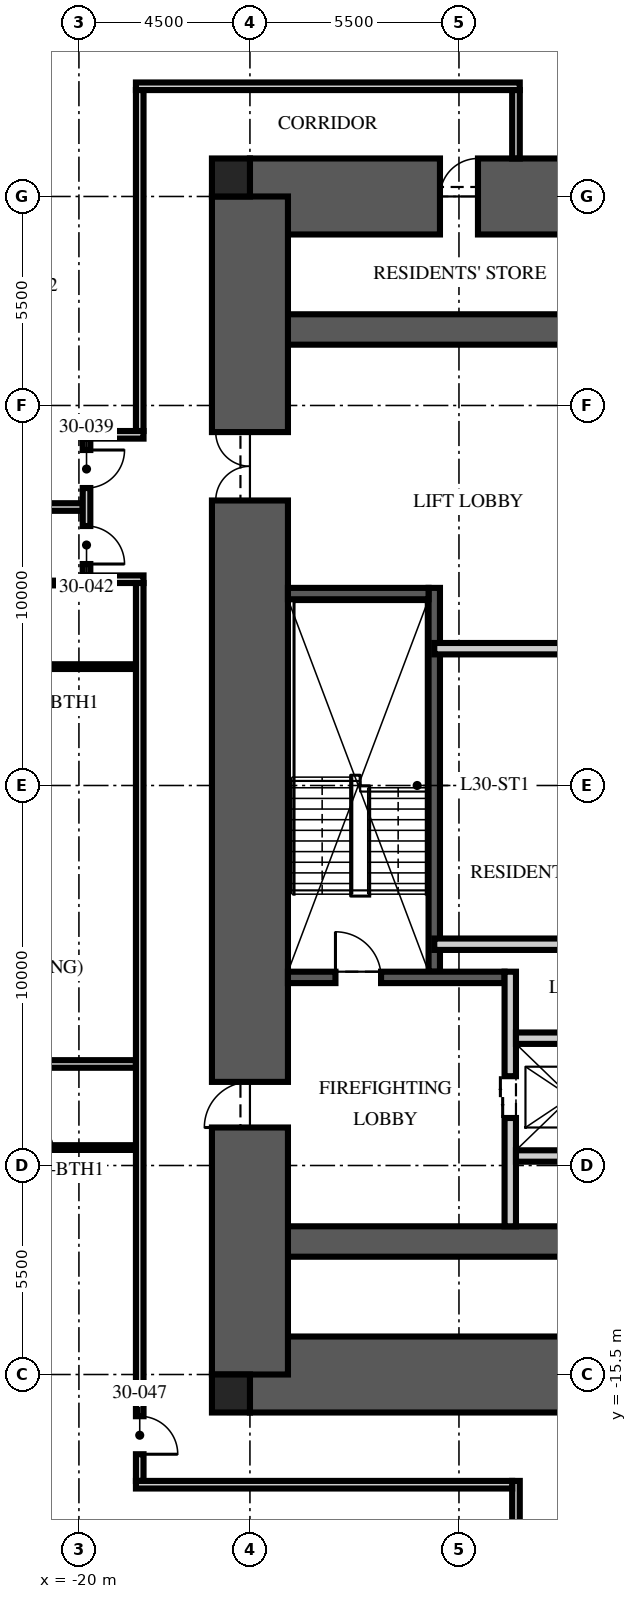
"""IFC4 building model, lengths in metres.
Left out: names, types, materials, properties, quantities, classifications, styles, units other than length and angle.
Written with IfcOpenShell. Run it as: python <this file> out.ifc"""

import sys

from ifc_helpers import new_model, si_unit, direction, frame, frame_2d, origin, origin_2d, place, context, subcontext, project, spatial, rectangle, extrude, element, fill, save


model = new_model("IFC4")
c1 = context("Model", 3, precision=1e-05, world=origin(), true_north=direction((0.0, 1.0)))
c2 = subcontext(c1, "Body", "Model", "MODEL_VIEW")
j1 = project(units=[si_unit("LENGTHUNIT", "METRE"), si_unit("PLANEANGLEUNIT", "RADIAN")], contexts=[c1])
p1 = place(None, origin())
s1 = spatial("IfcSite", under=j1, at=p1, CompositionType="ELEMENT")
p2 = place(p1, origin())
s2 = spatial("IfcBuilding", under=s1, at=p2, CompositionType="ELEMENT")
p3 = place(p2, frame((0.0, 0.0, 122.25)))
s3 = spatial("IfcBuildingStorey", under=s2, at=p3, CompositionType="ELEMENT", Elevation=122.25)
p4 = place(p3, frame((-15.5, 15.5, -0.25), z_axis=(0.0, 0.0, 1.0), x_axis=(1.0, 0.0, 0.0)))
e1 = element("IfcWall", 1, at=p4, inside=s3, PredefinedType="SHEAR", context=c2, shape_type="SweptSolid", body=[
    extrude(rectangle(XDim=31.0, YDim=2.0, at=frame_2d((15.5, 0.0))), origin(), (0.0, 0.0, 1.0), 3.75),
])
p5 = place(p4, frame((5.0, 0.0, 0.25)))
e2 = element("IfcOpeningElement", 2, at=p5, cuts=e1, PredefinedType="OPENING", context=c2, shape_type="SweptSolid", body=[
    extrude(rectangle(XDim=1.0, YDim=2.1, at=frame_2d((0.5, 1.05))), frame((0.0, 1.01, 0.0), z_axis=(0.0, -1.0, 0.0), x_axis=(1.0, 0.0, 0.0)), (0.0, 0.0, 1.0), 2.02),
])
p6 = place(p3, frame((-15.5, -15.5, -0.25), z_axis=(0.0, 0.0, 1.0), x_axis=(1.0, 0.0, 0.0)))
e3 = element("IfcWall", 3, at=p6, inside=s3, PredefinedType="SHEAR", context=c2, shape_type="SweptSolid", body=[
    extrude(rectangle(XDim=31.0, YDim=2.0, at=frame_2d((15.5, 0.0))), origin(), (0.0, 0.0, 1.0), 3.75),
])
p7 = place(p6, frame((10.4, 0.0, 0.25)))
e4 = element("IfcOpeningElement", 4, at=p7, cuts=e3, PredefinedType="OPENING", context=c2, shape_type="SweptSolid", body=[
    extrude(rectangle(XDim=1.1, YDim=2.1, at=frame_2d((0.55, 1.05))), frame((0.0, 1.01, 0.0), z_axis=(0.0, -1.0, 0.0), x_axis=(1.0, 0.0, 0.0)), (0.0, 0.0, 1.0), 2.02),
])
p8 = place(p6, frame((13.5, 0.0, 0.25)))
e5 = element("IfcOpeningElement", 5, at=p8, cuts=e3, PredefinedType="OPENING", context=c2, shape_type="SweptSolid", body=[
    extrude(rectangle(XDim=1.1, YDim=2.1, at=frame_2d((0.55, 1.05))), frame((0.0, 1.01, 0.0), z_axis=(0.0, -1.0, 0.0), x_axis=(1.0, 0.0, 0.0)), (0.0, 0.0, 1.0), 2.02),
])
p9 = place(p6, frame((16.6, 0.0, 0.25)))
e6 = element("IfcOpeningElement", 6, at=p9, cuts=e3, PredefinedType="OPENING", context=c2, shape_type="SweptSolid", body=[
    extrude(rectangle(XDim=1.1, YDim=2.1, at=frame_2d((0.55, 1.05))), frame((0.0, 1.01, 0.0), z_axis=(0.0, -1.0, 0.0), x_axis=(1.0, 0.0, 0.0)), (0.0, 0.0, 1.0), 2.02),
])
for number, where, z_axis, x_axis in (
    (7, (-15.5, 12.0, -0.25), (0.0, 0.0, 1.0), (1.0, 0.0, 0.0)),
    (8, (-15.5, -12.0, -0.25), (0.0, 0.0, 1.0), (1.0, 0.0, 0.0)),
):
    element("IfcWall", number, at=place(p3, frame(where, z_axis=z_axis, x_axis=x_axis)), inside=s3, PredefinedType="SHEAR", context=c2, shape_type="SweptSolid", body=[
        extrude(rectangle(XDim=31.0, YDim=0.8, at=frame_2d((15.5, 0.0))), origin(), (0.0, 0.0, 1.0), 3.75),
    ])
p10 = place(p3, frame((-15.5, -15.5, -0.25), z_axis=(0.0, 0.0, 1.0), x_axis=(0.0, 1.0, 0.0)))
e9 = element("IfcWall", 9, at=p10, inside=s3, PredefinedType="SHEAR", context=c2, shape_type="SweptSolid", body=[
    extrude(rectangle(XDim=31.0, YDim=2.0, at=frame_2d((15.5, 0.0))), origin(), (0.0, 0.0, 1.0), 3.75),
])
p11 = place(p10, frame((6.5, 0.0, 0.25)))
e10 = element("IfcOpeningElement", 10, at=p11, cuts=e9, PredefinedType="OPENING", context=c2, shape_type="SweptSolid", body=[
    extrude(rectangle(XDim=1.2, YDim=2.1, at=frame_2d((0.6, 1.05))), frame((0.0, 1.01, 0.0), z_axis=(0.0, -1.0, 0.0), x_axis=(1.0, 0.0, 0.0)), (0.0, 0.0, 1.0), 2.02),
])
p12 = place(p10, frame((23.0, 0.0, 0.25)))
e11 = element("IfcOpeningElement", 11, at=p12, cuts=e9, PredefinedType="OPENING", context=c2, shape_type="SweptSolid", body=[
    extrude(rectangle(XDim=1.8, YDim=2.1, at=frame_2d((0.9, 1.05))), frame((0.0, 1.01, 0.0), z_axis=(0.0, -1.0, 0.0), x_axis=(1.0, 0.0, 0.0)), (0.0, 0.0, 1.0), 2.02),
])
for number, where, z_axis, x_axis in (
    (12, (-16.0, 16.0, -0.25), (0.0, 0.0, 1.0), (1.0, 0.0, 0.0)),
    (13, (-16.0, -16.0, -0.25), (0.0, 0.0, 1.0), (1.0, 0.0, 0.0)),
):
    element("IfcColumn", number, at=place(p3, frame(where, z_axis=z_axis, x_axis=x_axis)), inside=s3, PredefinedType="COLUMN", context=c2, shape_type="SweptSolid", body=[
        extrude(rectangle(XDim=1.0, YDim=1.0, at=origin_2d()), origin(), (0.0, 0.0, 1.0), 3.75),
    ])
p13 = place(p3, frame((-10.65, -4.9, 0.0), z_axis=(0.0, 0.0, 1.0), x_axis=(0.0, 1.0, 0.0)))
e14 = element("IfcWall", 14, at=p13, inside=s3, PredefinedType="SOLIDWALL", context=c2, shape_type="SweptSolid", body=[
    extrude(rectangle(XDim=10.1, YDim=0.3, at=frame_2d((5.05, 0.0))), origin(), (0.0, 0.0, 1.0), 3.5),
])
p14 = place(p3, frame((-14.5, -5.05, 0.0), z_axis=(0.0, 0.0, 1.0), x_axis=(1.0, 0.0, 0.0)))
e15 = element("IfcWall", 15, at=p14, inside=s3, PredefinedType="SOLIDWALL", context=c2, shape_type="SweptSolid", body=[
    extrude(rectangle(XDim=5.7, YDim=0.3, at=frame_2d((2.85, 0.0))), origin(), (0.0, 0.0, 1.0), 3.5),
])
p15 = place(p14, frame((1.25, 0.0, 0.0)))
e16 = element("IfcOpeningElement", 16, at=p15, cuts=e15, PredefinedType="OPENING", context=c2, shape_type="SweptSolid", body=[
    extrude(rectangle(XDim=1.2, YDim=2.1, at=frame_2d((0.6, 1.05))), frame((0.0, 0.16, 0.0), z_axis=(0.0, -1.0, 0.0), x_axis=(1.0, 0.0, 0.0)), (0.0, 0.0, 1.0), 0.32),
])
p16 = place(p3, frame((-14.5, 5.05, 0.0), z_axis=(0.0, 0.0, 1.0), x_axis=(1.0, 0.0, 0.0)))
e17 = element("IfcWall", 17, at=p16, inside=s3, PredefinedType="SOLIDWALL", context=c2, shape_type="SweptSolid", body=[
    extrude(rectangle(XDim=3.7, YDim=0.3, at=frame_2d((1.85, 0.0))), origin(), (0.0, 0.0, 1.0), 3.5),
])
p17 = place(p3, frame((-8.65, -11.6, 0.0), z_axis=(0.0, 0.0, 1.0), x_axis=(0.0, 1.0, 0.0)))
e18 = element("IfcWall", 18, at=p17, inside=s3, PredefinedType="PARTITIONING", context=c2, shape_type="SweptSolid", body=[
    extrude(rectangle(XDim=6.7, YDim=0.3, at=frame_2d((3.35, 0.0))), origin(), (0.0, 0.0, 1.0), 3.5),
])
p18 = place(p17, frame((2.85, 0.0, 0.0)))
e19 = element("IfcOpeningElement", 19, at=p18, cuts=e18, PredefinedType="OPENING", context=c2, shape_type="SweptSolid", body=[
    extrude(rectangle(XDim=1.1, YDim=2.1, at=frame_2d((0.55, 1.05))), frame((0.0, 0.16, 0.0), z_axis=(0.0, -1.0, 0.0), x_axis=(1.0, 0.0, 0.0)), (0.0, 0.0, 1.0), 0.32),
])
p19 = place(p3, frame((-8.5, -6.65, 0.0), z_axis=(0.0, 0.0, 1.0), x_axis=(1.0, 0.0, 0.0)))
e20 = element("IfcWall", 20, at=p19, inside=s3, PredefinedType="PARTITIONING", context=c2, shape_type="SweptSolid", body=[
    extrude(rectangle(XDim=17.0, YDim=0.3, at=frame_2d((8.5, 0.0))), origin(), (0.0, 0.0, 1.0), 3.5),
])
p20 = place(p19, frame((7.8, 0.0, 0.0)))
e21 = element("IfcOpeningElement", 21, at=p20, cuts=e20, PredefinedType="OPENING", context=c2, shape_type="SweptSolid", body=[
    extrude(rectangle(XDim=1.3, YDim=2.4, at=frame_2d((0.65, 1.2))), frame((0.0, 0.16, 0.0), z_axis=(0.0, -1.0, 0.0), x_axis=(1.0, 0.0, 0.0)), (0.0, 0.0, 1.0), 0.32),
])
p21 = place(p19, frame((5.65, 0.0, 0.0)))
e22 = element("IfcOpeningElement", 22, at=p21, cuts=e20, PredefinedType="OPENING", context=c2, shape_type="SweptSolid", body=[
    extrude(rectangle(XDim=0.9, YDim=2.1, at=frame_2d((0.45, 1.05))), frame((0.0, 0.16, 0.0), z_axis=(0.0, -1.0, 0.0), x_axis=(1.0, 0.0, 0.0)), (0.0, 0.0, 1.0), 0.32),
])
p22 = place(p19, frame((10.4, 0.0, 0.0)))
e23 = element("IfcOpeningElement", 23, at=p22, cuts=e20, PredefinedType="OPENING", context=c2, shape_type="SweptSolid", body=[
    extrude(rectangle(XDim=0.9, YDim=2.1, at=frame_2d((0.45, 1.05))), frame((0.0, 0.16, 0.0), z_axis=(0.0, -1.0, 0.0), x_axis=(1.0, 0.0, 0.0)), (0.0, 0.0, 1.0), 0.32),
])
p23 = place(p3, frame((-8.5, -9.75, 0.0), z_axis=(0.0, 0.0, 1.0), x_axis=(1.0, 0.0, 0.0)))
e24 = element("IfcWall", 24, at=p23, inside=s3, PredefinedType="PARTITIONING", context=c2, shape_type="SweptSolid", body=[
    extrude(rectangle(XDim=2.9, YDim=0.3, at=frame_2d((1.45, 0.0))), origin(), (0.0, 0.0, 1.0), 3.5),
])
p24 = place(p3, frame((-10.65, 3.6, 0.0), z_axis=(0.0, 0.0, 1.0), x_axis=(1.0, 0.0, 0.0)))
e25 = element("IfcWall", 25, at=p24, inside=s3, PredefinedType="PARTITIONING", context=c2, shape_type="SweptSolid", body=[
    extrude(rectangle(XDim=21.3, YDim=0.3, at=frame_2d((10.65, 0.0))), origin(), (0.0, 0.0, 1.0), 3.5),
])
p25 = place(p24, frame((10.05, 0.0, 0.0)))
e26 = element("IfcOpeningElement", 26, at=p25, cuts=e25, PredefinedType="OPENING", context=c2, shape_type="SweptSolid", body=[
    extrude(rectangle(XDim=1.2, YDim=2.1, at=frame_2d((0.6, 1.05))), frame((0.0, 0.16, 0.0), z_axis=(0.0, -1.0, 0.0), x_axis=(1.0, 0.0, 0.0)), (0.0, 0.0, 1.0), 0.32),
])
p26 = place(p24, frame((19.238, 0.0, 0.0)))
e27 = element("IfcOpeningElement", 27, at=p26, cuts=e25, PredefinedType="OPENING", context=c2, shape_type="SweptSolid", body=[
    extrude(rectangle(XDim=0.9, YDim=2.1, at=frame_2d((0.45, 1.05))), frame((0.0, 0.16, 0.0), z_axis=(0.0, -1.0, 0.0), x_axis=(1.0, 0.0, 0.0)), (0.0, 0.0, 1.0), 0.32),
])
p27 = place(p3, frame((-10.65, -4.177, 0.0), z_axis=(0.0, 0.0, 1.0), x_axis=(1.0, 0.0, 0.0)))
e28 = element("IfcWall", 28, at=p27, inside=s3, PredefinedType="PARTITIONING", context=c2, shape_type="SweptSolid", body=[
    extrude(rectangle(XDim=6.45, YDim=0.3, at=frame_2d((3.225, 0.0))), origin(), (0.0, 0.0, 1.0), 3.5),
])
p28 = place(p3, frame((-18.5, 18.4, 0.0), z_axis=(0.0, 0.0, 1.0), x_axis=(1.0, 0.0, 0.0)))
e29 = element("IfcWall", 29, at=p28, inside=s3, PredefinedType="PARTITIONING", context=c2, shape_type="SweptSolid", body=[
    extrude(rectangle(XDim=10.1, YDim=0.2, at=frame_2d((5.05, 0.0))), origin(), (0.0, 0.0, 1.0), 2.3),
])
p29 = place(p3, frame((-8.5, 18.3, 0.0), z_axis=(0.0, 0.0, 1.0), x_axis=(0.0, -1.0, 0.0)))
e30 = element("IfcWall", 30, at=p29, inside=s3, PredefinedType="PARTITIONING", context=c2, shape_type="SweptSolid", body=[
    extrude(rectangle(XDim=1.8, YDim=0.2, at=frame_2d((0.9, 0.0))), origin(), (0.0, 0.0, 1.0), 3.5),
])
p30 = place(p3, frame((-19.9, 7.328, 0.0), z_axis=(0.0, 0.0, 1.0), x_axis=(-1.0, 0.0, 0.0)))
e31 = element("IfcWall", 31, at=p30, inside=s3, PredefinedType="PARTITIONING", context=c2, shape_type="SweptSolid", body=[
    extrude(rectangle(XDim=9.0, YDim=0.2, at=frame_2d((4.5, 0.0))), origin(), (0.0, 0.0, 1.0), 2.81),
])
p31 = place(p3, frame((-18.5, -7.328, 0.0), z_axis=(0.0, 0.0, 1.0), x_axis=(-1.0, 0.0, 0.0)))
e32 = element("IfcWall", 32, at=p31, inside=s3, PredefinedType="PARTITIONING", context=c2, shape_type="SweptSolid", body=[
    extrude(rectangle(XDim=10.4, YDim=0.2, at=frame_2d((5.2, 0.0))), origin(), (0.0, 0.0, 1.0), 2.81),
])
p32 = place(p3, frame((-19.97, 5.328, 0.0), z_axis=(0.0, 0.0, 1.0), x_axis=(-1.0, 0.0, 0.0)))
e33 = element("IfcWall", 33, at=p32, inside=s3, PredefinedType="PARTITIONING", context=c2, shape_type="SweptSolid", body=[
    extrude(rectangle(XDim=2.81, YDim=0.125, at=frame_2d((1.405, 0.0))), origin(), (0.0, 0.0, 1.0), 3.5),
])
for number, where, z_axis, x_axis in (
    (34, (-18.5, 3.128, 0.0), (0.0, 0.0, 1.0), (-1.0, 0.0, 0.0)),
    (35, (-18.5, -9.528, 0.0), (0.0, 0.0, 1.0), (-1.0, 0.0, 0.0)),
):
    element("IfcWall", number, at=place(p3, frame(where, z_axis=z_axis, x_axis=x_axis)), inside=s3, PredefinedType="PARTITIONING", context=c2, shape_type="SweptSolid", body=[
        extrude(rectangle(XDim=4.28, YDim=0.125, at=frame_2d((2.14, 0.0))), origin(), (0.0, 0.0, 1.0), 3.5),
    ])
p33 = place(p3, frame((-18.4, 18.3, 0.0), z_axis=(0.0, 0.0, 1.0), x_axis=(0.0, -1.0, 0.0)))
e36 = element("IfcWall", 36, at=p33, inside=s3, PredefinedType="PARTITIONING", context=c2, shape_type="SweptSolid", body=[
    extrude(rectangle(XDim=8.972, YDim=0.2, at=frame_2d((4.486, 0.0))), origin(), (0.0, 0.0, 1.0), 2.3),
])
p34 = place(p3, frame((-18.3, 9.228, 0.0), z_axis=(0.0, 0.0, 1.0), x_axis=(-1.0, 0.0, 0.0)))
e37 = element("IfcWall", 37, at=p34, inside=s3, PredefinedType="PARTITIONING", context=c2, shape_type="SweptSolid", body=[
    extrude(rectangle(XDim=1.6, YDim=0.2, at=frame_2d((0.8, 0.0))), origin(), (0.0, 0.0, 1.0), 2.7),
])
p35 = place(p3, frame((-18.3, 5.428, 0.0), z_axis=(0.0, 0.0, 1.0), x_axis=(-1.0, 0.0, 0.0)))
e38 = element("IfcWall", 38, at=p35, inside=s3, PredefinedType="PARTITIONING", context=c2, shape_type="SweptSolid", body=[
    extrude(rectangle(XDim=1.6, YDim=0.2, at=frame_2d((0.8, 0.0))), origin(), (0.0, 0.0, 1.0), 3.5),
])
p36 = place(p3, frame((-19.8, 9.128, 0.0), z_axis=(0.0, 0.0, 1.0), x_axis=(0.0, -1.0, 0.0)))
e39 = element("IfcWall", 39, at=p36, inside=s3, PredefinedType="PARTITIONING", context=c2, shape_type="SweptSolid", body=[
    extrude(rectangle(XDim=3.6, YDim=0.2, at=frame_2d((1.8, 0.0))), origin(), (0.0, 0.0, 1.0), 2.7),
])
p37 = place(p36, frame((0.3, 0.0, 0.0)))
e40 = element("IfcOpeningElement", 40, at=p37, cuts=e39, PredefinedType="OPENING", context=c2, shape_type="SweptSolid", body=[
    extrude(rectangle(XDim=1.0, YDim=2.2, at=frame_2d((0.5, 1.1))), frame((0.0, 0.11, 0.0), z_axis=(0.0, -1.0, 0.0), x_axis=(1.0, 0.0, 0.0)), (0.0, 0.0, 1.0), 0.22),
])
p38 = place(p36, frame((2.3, 0.0, 0.0)))
e41 = element("IfcOpeningElement", 41, at=p38, cuts=e39, PredefinedType="OPENING", context=c2, shape_type="SweptSolid", body=[
    extrude(rectangle(XDim=1.0, YDim=2.2, at=frame_2d((0.5, 1.1))), frame((0.0, 0.11, 0.0), z_axis=(0.0, -1.0, 0.0), x_axis=(1.0, 0.0, 0.0)), (0.0, 0.0, 1.0), 0.22),
])
p39 = place(p3, frame((-18.4, 5.328, 0.0), z_axis=(0.0, 0.0, 1.0), x_axis=(0.0, -1.0, 0.0)))
e42 = element("IfcWall", 42, at=p39, inside=s3, PredefinedType="PARTITIONING", context=c2, shape_type="SweptSolid", body=[
    extrude(rectangle(XDim=23.628, YDim=0.2, at=frame_2d((11.814, 0.0))), origin(), (0.0, 0.0, 1.0), 2.3),
])
p40 = place(p39, frame((21.926, 0.0, 0.0)))
e43 = element("IfcOpeningElement", 43, at=p40, cuts=e42, PredefinedType="OPENING", context=c2, shape_type="SweptSolid", body=[
    extrude(rectangle(XDim=1.0, YDim=2.2, at=frame_2d((0.5, 1.1))), frame((0.0, 0.11, 0.0), z_axis=(0.0, -1.0, 0.0), x_axis=(1.0, 0.0, 0.0)), (0.0, 0.0, 1.0), 0.22),
])
p41 = place(p3, frame((-8.5, -18.3, 0.0), z_axis=(0.0, 0.0, 1.0), x_axis=(0.0, -1.0, 0.0)))
e44 = element("IfcWall", 44, at=p41, inside=s3, PredefinedType="PARTITIONING", context=c2, shape_type="SweptSolid", body=[
    extrude(rectangle(XDim=3.0, YDim=0.2, at=frame_2d((1.5, 0.0))), origin(), (0.0, 0.0, 1.0), 3.5),
])
p42 = place(p3, frame((-8.6, -18.4, 0.0), z_axis=(0.0, 0.0, 1.0), x_axis=(-1.0, 0.0, 0.0)))
e45 = element("IfcWall", 45, at=p42, inside=s3, PredefinedType="PARTITIONING", context=c2, shape_type="SweptSolid", body=[
    extrude(rectangle(XDim=9.9, YDim=0.2, at=frame_2d((4.95, 0.0))), origin(), (0.0, 0.0, 1.0), 2.3),
])
p43 = place(p15, origin())
e46 = element("IfcDoor", 46, at=p43, inside=s3, OperationType="SINGLE_SWING_LEFT", PredefinedType="DOOR", context=c2, shape_type="SweptSolid", body=[
    extrude(rectangle(XDim=1.2, YDim=2.1, at=frame_2d((0.6, 1.05))), frame((0.0, 0.025, 0.0), z_axis=(0.0, -1.0, 0.0), x_axis=(1.0, 0.0, 0.0)), (0.0, 0.0, 1.0), 0.05),
])
fill(e16, e46)
p44 = place(p11, origin())
e47 = element("IfcDoor", 47, at=p44, inside=s3, OperationType="SINGLE_SWING_LEFT", PredefinedType="DOOR", context=c2, shape_type="SweptSolid", body=[
    extrude(rectangle(XDim=1.2, YDim=2.1, at=frame_2d((0.6, 1.05))), frame((0.0, 0.025, 0.0), z_axis=(0.0, -1.0, 0.0), x_axis=(1.0, 0.0, 0.0)), (0.0, 0.0, 1.0), 0.05),
])
fill(e10, e47)
p45 = place(p12, origin())
e48 = element("IfcDoor", 48, at=p45, inside=s3, OperationType="DOUBLE_DOOR_SINGLE_SWING", PredefinedType="DOOR", context=c2, shape_type="SweptSolid", body=[
    extrude(rectangle(XDim=1.8, YDim=2.1, at=frame_2d((0.9, 1.05))), frame((0.0, 0.025, 0.0), z_axis=(0.0, -1.0, 0.0), x_axis=(1.0, 0.0, 0.0)), (0.0, 0.0, 1.0), 0.05),
])
fill(e11, e48)
p46 = place(p18, origin())
e49 = element("IfcDoor", 49, at=p46, inside=s3, OperationType="DOUBLE_DOOR_SLIDING", PredefinedType="DOOR", context=c2, shape_type="SweptSolid", body=[
    extrude(rectangle(XDim=1.1, YDim=2.1, at=frame_2d((0.55, 1.05))), frame((0.0, 0.025, 0.0), z_axis=(0.0, -1.0, 0.0), x_axis=(1.0, 0.0, 0.0)), (0.0, 0.0, 1.0), 0.05),
])
fill(e19, e49)
p47 = place(p5, origin())
e50 = element("IfcDoor", 50, at=p47, inside=s3, OperationType="SINGLE_SWING_RIGHT", PredefinedType="DOOR", context=c2, shape_type="SweptSolid", body=[
    extrude(rectangle(XDim=1.0, YDim=2.1, at=frame_2d((0.5, 1.05))), frame((0.0, 0.025, 0.0), z_axis=(0.0, -1.0, 0.0), x_axis=(1.0, 0.0, 0.0)), (0.0, 0.0, 1.0), 0.05),
])
fill(e2, e50)
p48 = place(p37, origin())
e51 = element("IfcDoor", 51, at=p48, inside=s3, OperationType="SINGLE_SWING_LEFT", PredefinedType="DOOR", context=c2, shape_type="SweptSolid", body=[
    extrude(rectangle(XDim=1.0, YDim=2.2, at=frame_2d((0.5, 1.1))), frame((0.0, 0.025, 0.0), z_axis=(0.0, -1.0, 0.0), x_axis=(1.0, 0.0, 0.0)), (0.0, 0.0, 1.0), 0.05),
])
fill(e40, e51)
p49 = place(p38, origin())
e52 = element("IfcDoor", 52, at=p49, inside=s3, OperationType="SINGLE_SWING_RIGHT", PredefinedType="DOOR", context=c2, shape_type="SweptSolid", body=[
    extrude(rectangle(XDim=1.0, YDim=2.2, at=frame_2d((0.5, 1.1))), frame((0.0, 0.025, 0.0), z_axis=(0.0, -1.0, 0.0), x_axis=(1.0, 0.0, 0.0)), (0.0, 0.0, 1.0), 0.05),
])
fill(e41, e52)
p50 = place(p40, origin())
e53 = element("IfcDoor", 53, at=p50, inside=s3, OperationType="SINGLE_SWING_RIGHT", PredefinedType="DOOR", context=c2, shape_type="SweptSolid", body=[
    extrude(rectangle(XDim=1.0, YDim=2.2, at=frame_2d((0.5, 1.1))), frame((0.0, 0.025, 0.0), z_axis=(0.0, -1.0, 0.0), x_axis=(1.0, 0.0, 0.0)), (0.0, 0.0, 1.0), 0.05),
])
fill(e43, e53)
save(model, sys.argv[1])
